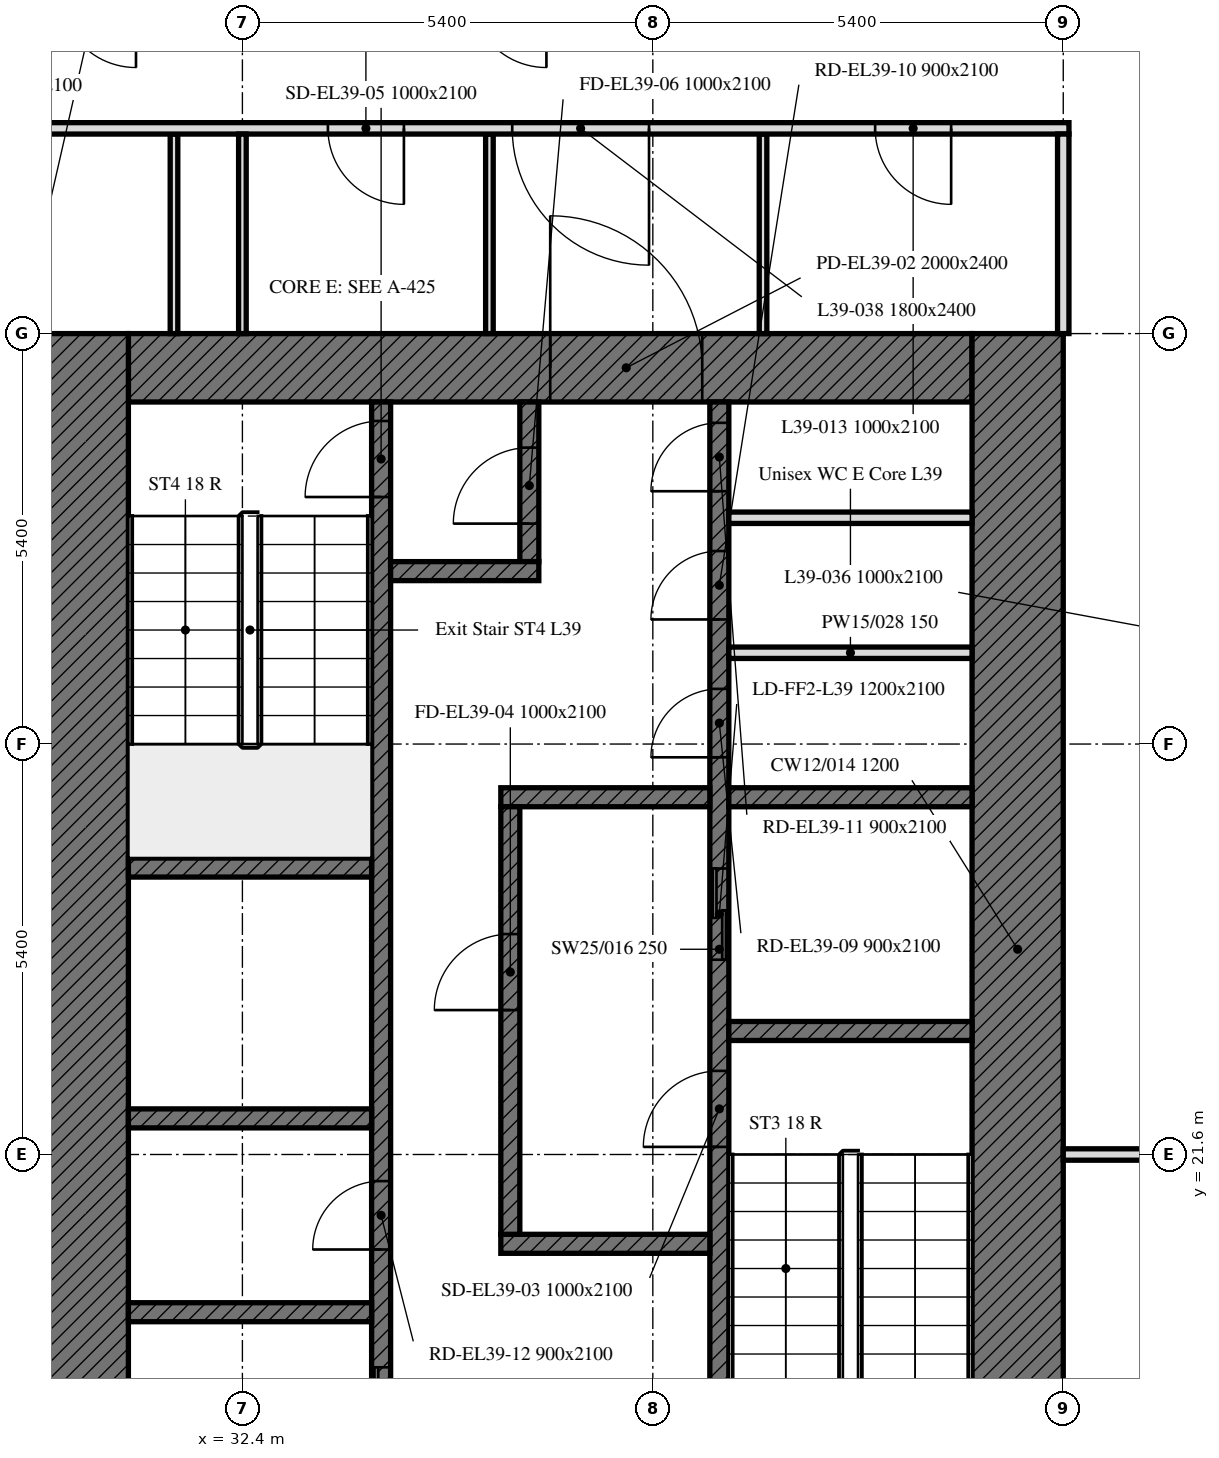
"""IFC4 building model, lengths in metres.
Left out: names, types, materials, properties, quantities, classifications, styles, units other than length and angle.
Written with IfcOpenShell. Run it as: python <this file> out.ifc"""

import sys

from ifc_helpers import new_model, si_unit, direction, frame, frame_2d, origin, place, context, subcontext, project, spatial, rectangle, extrude, element, fill, save


model = new_model("IFC4")
c1 = context("Model", 3, precision=1e-05, world=origin(), true_north=direction((0.0, 1.0)))
c2 = subcontext(c1, "Body", "Model", "MODEL_VIEW")
j1 = project(units=[si_unit("LENGTHUNIT", "METRE"), si_unit("PLANEANGLEUNIT", "RADIAN")], contexts=[c1])
p1 = place(None, origin())
s1 = spatial("IfcSite", under=j1, at=p1, CompositionType="ELEMENT")
p2 = place(p1, origin())
s2 = spatial("IfcBuilding", under=s1, at=p2, CompositionType="ELEMENT")
p3 = place(p2, frame((0.0, 0.0, 166.0)))
s3 = spatial("IfcBuildingStorey", under=s2, at=p3, CompositionType="ELEMENT", Elevation=166.0)
p4 = place(p3, frame((30.9, 31.95, 0.0), z_axis=(0.0, 0.0, 1.0), x_axis=(1.0, 0.0, 0.0)))
e1 = element("IfcWall", 1, at=p4, inside=s3, PredefinedType="SOLIDWALL", context=c2, shape_type="SweptSolid", body=[
    extrude(rectangle(XDim=11.1, YDim=0.9, at=frame_2d((5.55, 0.0))), origin(), (0.0, 0.0, 1.0), 3.0),
])
p5 = place(p4, frame((5.55, 0.0, 0.0)))
e2 = element("IfcOpeningElement", 2, at=p5, cuts=e1, PredefinedType="OPENING", context=c2, shape_type="SweptSolid", body=[
    extrude(rectangle(XDim=2.0, YDim=2.4, at=frame_2d((1.0, 1.2))), frame((0.0, 0.45, 0.0), z_axis=(0.0, -1.0, 0.0), x_axis=(1.0, 0.0, 0.0)), (0.0, 0.0, 1.0), 0.9),
])
for number, where, z_axis, x_axis in (
    (3, (42.6, 32.4, 0.0), (0.0, 0.0, 1.0), (0.0, -1.0, 0.0)),
    (4, (30.3, 16.2, 0.0), (0.0, 0.0, 1.0), (0.0, 1.0, 0.0)),
):
    element("IfcWall", number, at=place(p3, frame(where, z_axis=z_axis, x_axis=x_axis)), inside=s3, PredefinedType="SOLIDWALL", context=c2, shape_type="SweptSolid", body=[
        extrude(rectangle(XDim=16.2, YDim=1.2, at=frame_2d((8.1, 0.0))), origin(), (0.0, 0.0, 1.0), 3.0),
    ])
p6 = place(p3, frame((38.675, 17.1, 0.0), z_axis=(0.0, 0.0, 1.0), x_axis=(0.0, 1.0, 0.0)))
e5 = element("IfcWall", 5, at=p6, inside=s3, PredefinedType="SOLIDWALL", context=c2, shape_type="SweptSolid", body=[
    extrude(rectangle(XDim=14.4, YDim=0.25, at=frame_2d((7.2, 0.0))), origin(), (0.0, 0.0, 1.0), 3.0),
])
p7 = place(p6, frame((4.6, 0.0, 0.0)))
e6 = element("IfcOpeningElement", 6, at=p7, cuts=e5, PredefinedType="OPENING", context=c2, shape_type="SweptSolid", body=[
    extrude(rectangle(XDim=1.0, YDim=2.1, at=frame_2d((0.5, 1.05))), frame((0.0, 0.125, 0.0), z_axis=(0.0, -1.0, 0.0), x_axis=(1.0, 0.0, 0.0)), (0.0, 0.0, 1.0), 0.25),
])
p8 = place(p6, frame((7.062, 0.0, 0.0)))
e7 = element("IfcOpeningElement", 7, at=p8, cuts=e5, PredefinedType="OPENING", context=c2, shape_type="SweptSolid", body=[
    extrude(rectangle(XDim=1.2, YDim=2.1, at=frame_2d((0.6, 1.05))), frame((0.0, 0.125, 0.0), z_axis=(0.0, -1.0, 0.0), x_axis=(1.0, 0.0, 0.0)), (0.0, 0.0, 1.0), 0.25),
])
p9 = place(p6, frame((9.726, 0.0, 0.0)))
e8 = element("IfcOpeningElement", 8, at=p9, cuts=e5, PredefinedType="OPENING", context=c2, shape_type="SweptSolid", body=[
    extrude(rectangle(XDim=0.9, YDim=2.1, at=frame_2d((0.45, 1.05))), frame((0.0, 0.125, 0.0), z_axis=(0.0, -1.0, 0.0), x_axis=(1.0, 0.0, 0.0)), (0.0, 0.0, 1.0), 0.25),
])
p10 = place(p6, frame((11.539, 0.0, 0.0)))
e9 = element("IfcOpeningElement", 9, at=p10, cuts=e5, PredefinedType="OPENING", context=c2, shape_type="SweptSolid", body=[
    extrude(rectangle(XDim=0.9, YDim=2.1, at=frame_2d((0.45, 1.05))), frame((0.0, 0.125, 0.0), z_axis=(0.0, -1.0, 0.0), x_axis=(1.0, 0.0, 0.0)), (0.0, 0.0, 1.0), 0.25),
])
p11 = place(p6, frame((13.226, 0.0, 0.0)))
e10 = element("IfcOpeningElement", 10, at=p11, cuts=e5, PredefinedType="OPENING", context=c2, shape_type="SweptSolid", body=[
    extrude(rectangle(XDim=0.9, YDim=2.1, at=frame_2d((0.45, 1.05))), frame((0.0, 0.125, 0.0), z_axis=(0.0, -1.0, 0.0), x_axis=(1.0, 0.0, 0.0)), (0.0, 0.0, 1.0), 0.25),
])
p12 = place(p3, frame((34.225, 17.1, 0.0), z_axis=(0.0, 0.0, 1.0), x_axis=(0.0, 1.0, 0.0)))
e11 = element("IfcWall", 11, at=p12, inside=s3, PredefinedType="SOLIDWALL", context=c2, shape_type="SweptSolid", body=[
    extrude(rectangle(XDim=14.4, YDim=0.25, at=frame_2d((7.2, 0.0))), origin(), (0.0, 0.0, 1.0), 3.0),
])
p13 = place(p12, frame((13.15, 0.0, 0.0)))
e12 = element("IfcOpeningElement", 12, at=p13, cuts=e11, PredefinedType="OPENING", context=c2, shape_type="SweptSolid", body=[
    extrude(rectangle(XDim=1.0, YDim=2.1, at=frame_2d((0.5, 1.05))), frame((0.0, 0.125, 0.0), z_axis=(0.0, -1.0, 0.0), x_axis=(1.0, 0.0, 0.0)), (0.0, 0.0, 1.0), 0.25),
])
p14 = place(p12, frame((0.6, 0.0, 0.0)))
e13 = element("IfcOpeningElement", 13, at=p14, cuts=e11, PredefinedType="OPENING", context=c2, shape_type="SweptSolid", body=[
    extrude(rectangle(XDim=1.1, YDim=2.1, at=frame_2d((0.55, 1.05))), frame((0.0, 0.125, 0.0), z_axis=(0.0, -1.0, 0.0), x_axis=(1.0, 0.0, 0.0)), (0.0, 0.0, 1.0), 0.25),
])
p15 = place(p12, frame((3.25, 0.0, 0.0)))
e14 = element("IfcOpeningElement", 14, at=p15, cuts=e11, PredefinedType="OPENING", context=c2, shape_type="SweptSolid", body=[
    extrude(rectangle(XDim=0.9, YDim=2.1, at=frame_2d((0.45, 1.05))), frame((0.0, 0.125, 0.0), z_axis=(0.0, -1.0, 0.0), x_axis=(1.0, 0.0, 0.0)), (0.0, 0.0, 1.0), 0.25),
])
p16 = place(p3, frame((38.8, 23.225, 0.0), z_axis=(0.0, 0.0, 1.0), x_axis=(1.0, 0.0, 0.0)))
e15 = element("IfcWall", 15, at=p16, inside=s3, PredefinedType="SOLIDWALL", context=c2, shape_type="SweptSolid", body=[
    extrude(rectangle(XDim=3.2, YDim=0.25, at=frame_2d((1.6, 0.0))), origin(), (0.0, 0.0, 1.0), 3.0),
])
for number, where, z_axis, x_axis in (
    (16, (30.9, 25.375, 0.0), (0.0, 0.0, 1.0), (1.0, 0.0, 0.0)),
    (17, (30.9, 22.075, 0.0), (0.0, 0.0, 1.0), (1.0, 0.0, 0.0)),
):
    element("IfcWall", number, at=place(p3, frame(where, z_axis=z_axis, x_axis=x_axis)), inside=s3, PredefinedType="SOLIDWALL", context=c2, shape_type="SweptSolid", body=[
        extrude(rectangle(XDim=3.2, YDim=0.25, at=frame_2d((1.6, 0.0))), origin(), (0.0, 0.0, 1.0), 3.0),
    ])
p17 = place(p3, frame((38.8, 26.3, 0.0), z_axis=(0.0, 0.0, 1.0), x_axis=(1.0, 0.0, 0.0)))
e18 = element("IfcWall", 18, at=p17, inside=s3, PredefinedType="SOLIDWALL", context=c2, shape_type="SweptSolid", body=[
    extrude(rectangle(XDim=3.2, YDim=0.25, at=frame_2d((1.6, 0.0))), origin(), (0.0, 0.0, 1.0), 3.0),
])
for number, where, z_axis, x_axis in (
    (19, (35.8, 26.3, 0.0), (0.0, 0.0, 1.0), (1.0, 0.0, 0.0)),
    (20, (35.8, 20.425, 0.0), (0.0, 0.0, 1.0), (1.0, 0.0, 0.0)),
):
    element("IfcWall", number, at=place(p3, frame(where, z_axis=z_axis, x_axis=x_axis)), inside=s3, PredefinedType="SOLIDWALL", context=c2, shape_type="SweptSolid", body=[
        extrude(rectangle(XDim=2.75, YDim=0.25, at=frame_2d((1.375, 0.0))), origin(), (0.0, 0.0, 1.0), 3.0),
    ])
p18 = place(p3, frame((36.175, 29.4, 0.0), z_axis=(0.0, 0.0, 1.0), x_axis=(0.0, 1.0, 0.0)))
e21 = element("IfcWall", 21, at=p18, inside=s3, PredefinedType="SOLIDWALL", context=c2, shape_type="SweptSolid", body=[
    extrude(rectangle(XDim=2.1, YDim=0.25, at=frame_2d((1.05, 0.0))), origin(), (0.0, 0.0, 1.0), 3.0),
])
p19 = place(p18, frame((0.5, 0.0, 0.0)))
e22 = element("IfcOpeningElement", 22, at=p19, cuts=e21, PredefinedType="OPENING", context=c2, shape_type="SweptSolid", body=[
    extrude(rectangle(XDim=1.0, YDim=2.1, at=frame_2d((0.5, 1.05))), frame((0.0, 0.125, 0.0), z_axis=(0.0, -1.0, 0.0), x_axis=(1.0, 0.0, 0.0)), (0.0, 0.0, 1.0), 0.25),
])
p20 = place(p3, frame((34.35, 29.275, 0.0), z_axis=(0.0, 0.0, 1.0), x_axis=(1.0, 0.0, 0.0)))
e23 = element("IfcWall", 23, at=p20, inside=s3, PredefinedType="SOLIDWALL", context=c2, shape_type="SweptSolid", body=[
    extrude(rectangle(XDim=1.95, YDim=0.25, at=frame_2d((0.975, 0.0))), origin(), (0.0, 0.0, 1.0), 3.0),
])
p21 = place(p3, frame((35.925, 20.55, 0.0), z_axis=(0.0, 0.0, 1.0), x_axis=(0.0, 1.0, 0.0)))
e24 = element("IfcWall", 24, at=p21, inside=s3, PredefinedType="SOLIDWALL", context=c2, shape_type="SweptSolid", body=[
    extrude(rectangle(XDim=5.625, YDim=0.25, at=frame_2d((2.812, 0.0))), origin(), (0.0, 0.0, 1.0), 3.0),
])
p22 = place(p21, frame((2.95, 0.0, 0.0)))
e25 = element("IfcOpeningElement", 25, at=p22, cuts=e24, PredefinedType="OPENING", context=c2, shape_type="SweptSolid", body=[
    extrude(rectangle(XDim=1.0, YDim=2.1, at=frame_2d((0.5, 1.05))), frame((0.0, 0.125, 0.0), z_axis=(0.0, -1.0, 0.0), x_axis=(1.0, 0.0, 0.0)), (0.0, 0.0, 1.0), 0.25),
])
p23 = place(p3, frame((30.9, 19.525, 0.0), z_axis=(0.0, 0.0, 1.0), x_axis=(1.0, 0.0, 0.0)))
e26 = element("IfcWall", 26, at=p23, inside=s3, PredefinedType="SOLIDWALL", context=c2, shape_type="SweptSolid", body=[
    extrude(rectangle(XDim=3.2, YDim=0.25, at=frame_2d((1.6, 0.0))), origin(), (0.0, 0.0, 1.0), 3.0),
])
for number, where, z_axis, x_axis in (
    (27, (38.8, 28.201, 0.0), (0.0, 0.0, 1.0), (1.0, 0.0, 0.0)),
    (28, (38.8, 29.977, 0.0), (0.0, 0.0, 1.0), (1.0, 0.0, 0.0)),
):
    element("IfcWall", number, at=place(p3, frame(where, z_axis=z_axis, x_axis=x_axis)), inside=s3, PredefinedType="PARTITIONING", context=c2, shape_type="SweptSolid", body=[
        extrude(rectangle(XDim=3.2, YDim=0.15, at=frame_2d((1.6, 0.0))), origin(), (0.0, 0.0, 1.0), 3.0),
    ])
for number, where, z_axis, x_axis in (
    (29, (31.5, 32.4, 0.0), (0.0, 0.0, 1.0), (0.0, 1.0, 0.0)),
    (30, (35.65, 35.025, 0.0), (0.0, 0.0, 1.0), (0.0, -1.0, 0.0)),
    (31, (39.25, 32.4, 0.0), (0.0, 0.0, 1.0), (0.0, 1.0, 0.0)),
):
    element("IfcWall", number, at=place(p3, frame(where, z_axis=z_axis, x_axis=x_axis)), inside=s3, PredefinedType="PARTITIONING", context=c2, shape_type="SweptSolid", body=[
        extrude(rectangle(XDim=2.625, YDim=0.1, at=frame_2d((1.312, 0.0))), origin(), (0.0, 0.0, 1.0), 3.0),
    ])
p24 = place(p3, frame((43.2, 21.6, 0.0), z_axis=(0.0, 0.0, 1.0), x_axis=(1.0, 0.0, 0.0)))
e32 = element("IfcWall", 32, at=p24, inside=s3, PredefinedType="PARTITIONING", context=c2, shape_type="SweptSolid", body=[
    extrude(rectangle(XDim=4.649, YDim=0.15, at=frame_2d((2.325, 0.0))), origin(), (0.0, 0.0, 1.0), 2.4),
])
p25 = place(p3, frame((43.275, 35.1, 0.0), z_axis=(0.0, 0.0, 1.0), x_axis=(-1.0, 0.0, 0.0)))
e33 = element("IfcWall", 33, at=p25, inside=s3, PredefinedType="PARTITIONING", context=c2, shape_type="SweptSolid", body=[
    extrude(rectangle(XDim=37.124, YDim=0.15, at=frame_2d((18.562, 0.0))), origin(), (0.0, 0.0, 1.0), 3.0),
])
p26 = place(p25, frame((24.775, 0.0, 0.0)))
e34 = element("IfcOpeningElement", 34, at=p26, cuts=e33, PredefinedType="OPENING", context=c2, shape_type="SweptSolid", body=[
    extrude(rectangle(XDim=1.0, YDim=2.1, at=frame_2d((0.5, 1.05))), frame((0.0, 0.075, 0.0), z_axis=(0.0, -1.0, 0.0), x_axis=(1.0, 0.0, 0.0)), (0.0, 0.0, 1.0), 0.15),
])
p27 = place(p25, frame((18.475, 0.0, 0.0)))
e35 = element("IfcOpeningElement", 35, at=p27, cuts=e33, PredefinedType="OPENING", context=c2, shape_type="SweptSolid", body=[
    extrude(rectangle(XDim=1.0, YDim=2.1, at=frame_2d((0.5, 1.05))), frame((0.0, 0.075, 0.0), z_axis=(0.0, -1.0, 0.0), x_axis=(1.0, 0.0, 0.0)), (0.0, 0.0, 1.0), 0.15),
])
p28 = place(p25, frame((13.525, 0.0, 0.0)))
e36 = element("IfcOpeningElement", 36, at=p28, cuts=e33, PredefinedType="OPENING", context=c2, shape_type="SweptSolid", body=[
    extrude(rectangle(XDim=1.0, YDim=2.1, at=frame_2d((0.5, 1.05))), frame((0.0, 0.075, 0.0), z_axis=(0.0, -1.0, 0.0), x_axis=(1.0, 0.0, 0.0)), (0.0, 0.0, 1.0), 0.15),
])
p29 = place(p25, frame((34.095, 0.0, 0.0)))
e37 = element("IfcOpeningElement", 37, at=p29, cuts=e33, PredefinedType="OPENING", context=c2, shape_type="SweptSolid", body=[
    extrude(rectangle(XDim=1.0, YDim=2.1, at=frame_2d((0.5, 1.05))), frame((0.0, 0.075, 0.0), z_axis=(0.0, -1.0, 0.0), x_axis=(1.0, 0.0, 0.0)), (0.0, 0.0, 1.0), 0.15),
])
p30 = place(p25, frame((8.75, 0.0, 0.0)))
e38 = element("IfcOpeningElement", 38, at=p30, cuts=e33, PredefinedType="OPENING", context=c2, shape_type="SweptSolid", body=[
    extrude(rectangle(XDim=1.0, YDim=2.1, at=frame_2d((0.5, 1.05))), frame((0.0, 0.075, 0.0), z_axis=(0.0, -1.0, 0.0), x_axis=(1.0, 0.0, 0.0)), (0.0, 0.0, 1.0), 0.15),
])
p31 = place(p25, frame((1.55, 0.0, 0.0)))
e39 = element("IfcOpeningElement", 39, at=p31, cuts=e33, PredefinedType="OPENING", context=c2, shape_type="SweptSolid", body=[
    extrude(rectangle(XDim=1.0, YDim=2.1, at=frame_2d((0.5, 1.05))), frame((0.0, 0.075, 0.0), z_axis=(0.0, -1.0, 0.0), x_axis=(1.0, 0.0, 0.0)), (0.0, 0.0, 1.0), 0.15),
])
p32 = place(p25, frame((28.2, 0.0, 0.0)))
e40 = element("IfcOpeningElement", 40, at=p32, cuts=e33, PredefinedType="OPENING", context=c2, shape_type="SweptSolid", body=[
    extrude(rectangle(XDim=1.0, YDim=2.1, at=frame_2d((0.5, 1.05))), frame((0.0, 0.075, 0.0), z_axis=(0.0, -1.0, 0.0), x_axis=(1.0, 0.0, 0.0)), (0.0, 0.0, 1.0), 0.15),
])
p33 = place(p25, frame((30.625, 0.0, 0.0)))
e41 = element("IfcOpeningElement", 41, at=p33, cuts=e33, PredefinedType="OPENING", context=c2, shape_type="SweptSolid", body=[
    extrude(rectangle(XDim=1.8, YDim=2.4, at=frame_2d((0.9, 1.2))), frame((0.0, 0.075, 0.0), z_axis=(0.0, -1.0, 0.0), x_axis=(1.0, 0.0, 0.0)), (0.0, 0.0, 1.0), 0.15),
])
p34 = place(p25, frame((5.525, 0.0, 0.0)))
e42 = element("IfcOpeningElement", 42, at=p34, cuts=e33, PredefinedType="OPENING", context=c2, shape_type="SweptSolid", body=[
    extrude(rectangle(XDim=1.8, YDim=2.4, at=frame_2d((0.9, 1.2))), frame((0.0, 0.075, 0.0), z_axis=(0.0, -1.0, 0.0), x_axis=(1.0, 0.0, 0.0)), (0.0, 0.0, 1.0), 0.15),
])
p35 = place(p3, frame((43.2, 35.025, 0.0), z_axis=(0.0, 0.0, 1.0), x_axis=(0.0, -1.0, 0.0)))
e43 = element("IfcWall", 43, at=p35, inside=s3, PredefinedType="PARTITIONING", context=c2, shape_type="SweptSolid", body=[
    extrude(rectangle(XDim=2.625, YDim=0.15, at=frame_2d((1.312, 0.0))), origin(), (0.0, 0.0, 1.0), 3.0),
])
p36 = place(p3, frame((32.4, 35.025, 0.0), z_axis=(0.0, 0.0, 1.0), x_axis=(0.0, -1.0, 0.0)))
e44 = element("IfcWall", 44, at=p36, inside=s3, PredefinedType="PARTITIONING", context=c2, shape_type="SweptSolid", body=[
    extrude(rectangle(XDim=2.625, YDim=0.1, at=frame_2d((1.312, 0.0))), origin(), (0.0, 0.0, 1.0), 3.0),
])
p37 = place(p5, origin())
e45 = element("IfcDoor", 45, at=p37, inside=s3, OperationType="DOUBLE_DOOR_SINGLE_SWING", PredefinedType="DOOR", context=c2, shape_type="SweptSolid", body=[
    extrude(rectangle(XDim=2.0, YDim=2.4, at=frame_2d((1.0, 1.2))), frame((0.0, 0.025, 0.0), z_axis=(0.0, -1.0, 0.0), x_axis=(1.0, 0.0, 0.0)), (0.0, 0.0, 1.0), 0.05),
])
fill(e2, e45)
p38 = place(p7, origin())
e46 = element("IfcDoor", 46, at=p38, inside=s3, OperationType="SINGLE_SWING_LEFT", PredefinedType="DOOR", context=c2, shape_type="SweptSolid", body=[
    extrude(rectangle(XDim=1.0, YDim=2.1, at=frame_2d((0.5, 1.05))), frame((0.0, 0.025, 0.0), z_axis=(0.0, -1.0, 0.0), x_axis=(1.0, 0.0, 0.0)), (0.0, 0.0, 1.0), 0.05),
])
fill(e6, e46)
p39 = place(p22, origin())
e47 = element("IfcDoor", 47, at=p39, inside=s3, OperationType="SINGLE_SWING_LEFT", PredefinedType="DOOR", context=c2, shape_type="SweptSolid", body=[
    extrude(rectangle(XDim=1.0, YDim=2.1, at=frame_2d((0.5, 1.05))), frame((0.0, 0.025, 0.0), z_axis=(0.0, -1.0, 0.0), x_axis=(1.0, 0.0, 0.0)), (0.0, 0.0, 1.0), 0.05),
])
fill(e25, e47)
p40 = place(p13, origin())
e48 = element("IfcDoor", 48, at=p40, inside=s3, OperationType="SINGLE_SWING_LEFT", PredefinedType="DOOR", context=c2, shape_type="SweptSolid", body=[
    extrude(rectangle(XDim=1.0, YDim=2.1, at=frame_2d((0.5, 1.05))), frame((0.0, 0.025, 0.0), z_axis=(0.0, -1.0, 0.0), x_axis=(1.0, 0.0, 0.0)), (0.0, 0.0, 1.0), 0.05),
])
fill(e12, e48)
p41 = place(p19, origin())
e49 = element("IfcDoor", 49, at=p41, inside=s3, OperationType="SINGLE_SWING_LEFT", PredefinedType="DOOR", context=c2, shape_type="SweptSolid", body=[
    extrude(rectangle(XDim=1.0, YDim=2.1, at=frame_2d((0.5, 1.05))), frame((0.0, 0.025, 0.0), z_axis=(0.0, -1.0, 0.0), x_axis=(1.0, 0.0, 0.0)), (0.0, 0.0, 1.0), 0.05),
])
fill(e22, e49)
p42 = place(p8, origin())
e50 = element("IfcDoor", 50, at=p42, inside=s3, OperationType="DOUBLE_DOOR_SLIDING", PredefinedType="DOOR", context=c2, shape_type="SweptSolid", body=[
    extrude(rectangle(XDim=1.2, YDim=2.1, at=frame_2d((0.6, 1.05))), frame((0.0, 0.025, 0.0), z_axis=(0.0, -1.0, 0.0), x_axis=(1.0, 0.0, 0.0)), (0.0, 0.0, 1.0), 0.05),
])
fill(e7, e50)
p43 = place(p14, origin())
e51 = element("IfcDoor", 51, at=p43, inside=s3, OperationType="DOUBLE_DOOR_SLIDING", PredefinedType="DOOR", context=c2, shape_type="SweptSolid", body=[
    extrude(rectangle(XDim=1.1, YDim=2.1, at=frame_2d((0.55, 1.05))), frame((0.0, 0.025, 0.0), z_axis=(0.0, -1.0, 0.0), x_axis=(1.0, 0.0, 0.0)), (0.0, 0.0, 1.0), 0.05),
])
fill(e13, e51)
p44 = place(p9, origin())
e52 = element("IfcDoor", 52, at=p44, inside=s3, OperationType="SINGLE_SWING_LEFT", PredefinedType="DOOR", context=c2, shape_type="SweptSolid", body=[
    extrude(rectangle(XDim=0.9, YDim=2.1, at=frame_2d((0.45, 1.05))), frame((0.0, 0.025, 0.0), z_axis=(0.0, -1.0, 0.0), x_axis=(1.0, 0.0, 0.0)), (0.0, 0.0, 1.0), 0.05),
])
fill(e8, e52)
p45 = place(p10, origin())
e53 = element("IfcDoor", 53, at=p45, inside=s3, OperationType="SINGLE_SWING_LEFT", PredefinedType="DOOR", context=c2, shape_type="SweptSolid", body=[
    extrude(rectangle(XDim=0.9, YDim=2.1, at=frame_2d((0.45, 1.05))), frame((0.0, 0.025, 0.0), z_axis=(0.0, -1.0, 0.0), x_axis=(1.0, 0.0, 0.0)), (0.0, 0.0, 1.0), 0.05),
])
fill(e9, e53)
p46 = place(p11, origin())
e54 = element("IfcDoor", 54, at=p46, inside=s3, OperationType="SINGLE_SWING_LEFT", PredefinedType="DOOR", context=c2, shape_type="SweptSolid", body=[
    extrude(rectangle(XDim=0.9, YDim=2.1, at=frame_2d((0.45, 1.05))), frame((0.0, 0.025, 0.0), z_axis=(0.0, -1.0, 0.0), x_axis=(1.0, 0.0, 0.0)), (0.0, 0.0, 1.0), 0.05),
])
fill(e10, e54)
p47 = place(p15, origin())
e55 = element("IfcDoor", 55, at=p47, inside=s3, OperationType="SINGLE_SWING_LEFT", PredefinedType="DOOR", context=c2, shape_type="SweptSolid", body=[
    extrude(rectangle(XDim=0.9, YDim=2.1, at=frame_2d((0.45, 1.05))), frame((0.0, 0.025, 0.0), z_axis=(0.0, -1.0, 0.0), x_axis=(1.0, 0.0, 0.0)), (0.0, 0.0, 1.0), 0.05),
])
fill(e14, e55)
p48 = place(p30, origin())
e56 = element("IfcDoor", 56, at=p48, inside=s3, OperationType="SINGLE_SWING_LEFT", PredefinedType="DOOR", context=c2, shape_type="SweptSolid", body=[
    extrude(rectangle(XDim=1.0, YDim=2.1, at=frame_2d((0.5, 1.05))), frame((0.0, 0.025, 0.0), z_axis=(0.0, -1.0, 0.0), x_axis=(1.0, 0.0, 0.0)), (0.0, 0.0, 1.0), 0.05),
])
fill(e38, e56)
p49 = place(p31, origin())
e57 = element("IfcDoor", 57, at=p49, inside=s3, OperationType="SINGLE_SWING_RIGHT", PredefinedType="DOOR", context=c2, shape_type="SweptSolid", body=[
    extrude(rectangle(XDim=1.0, YDim=2.1, at=frame_2d((0.5, 1.05))), frame((0.0, 0.025, 0.0), z_axis=(0.0, -1.0, 0.0), x_axis=(1.0, 0.0, 0.0)), (0.0, 0.0, 1.0), 0.05),
])
fill(e39, e57)
p50 = place(p34, origin())
e58 = element("IfcDoor", 58, at=p50, inside=s3, OperationType="DOUBLE_DOOR_SINGLE_SWING", PredefinedType="DOOR", context=c2, shape_type="SweptSolid", body=[
    extrude(rectangle(XDim=1.8, YDim=2.4, at=frame_2d((0.9, 1.2))), frame((0.0, 0.025, 0.0), z_axis=(0.0, -1.0, 0.0), x_axis=(1.0, 0.0, 0.0)), (0.0, 0.0, 1.0), 0.05),
])
fill(e42, e58)
save(model, sys.argv[1])
